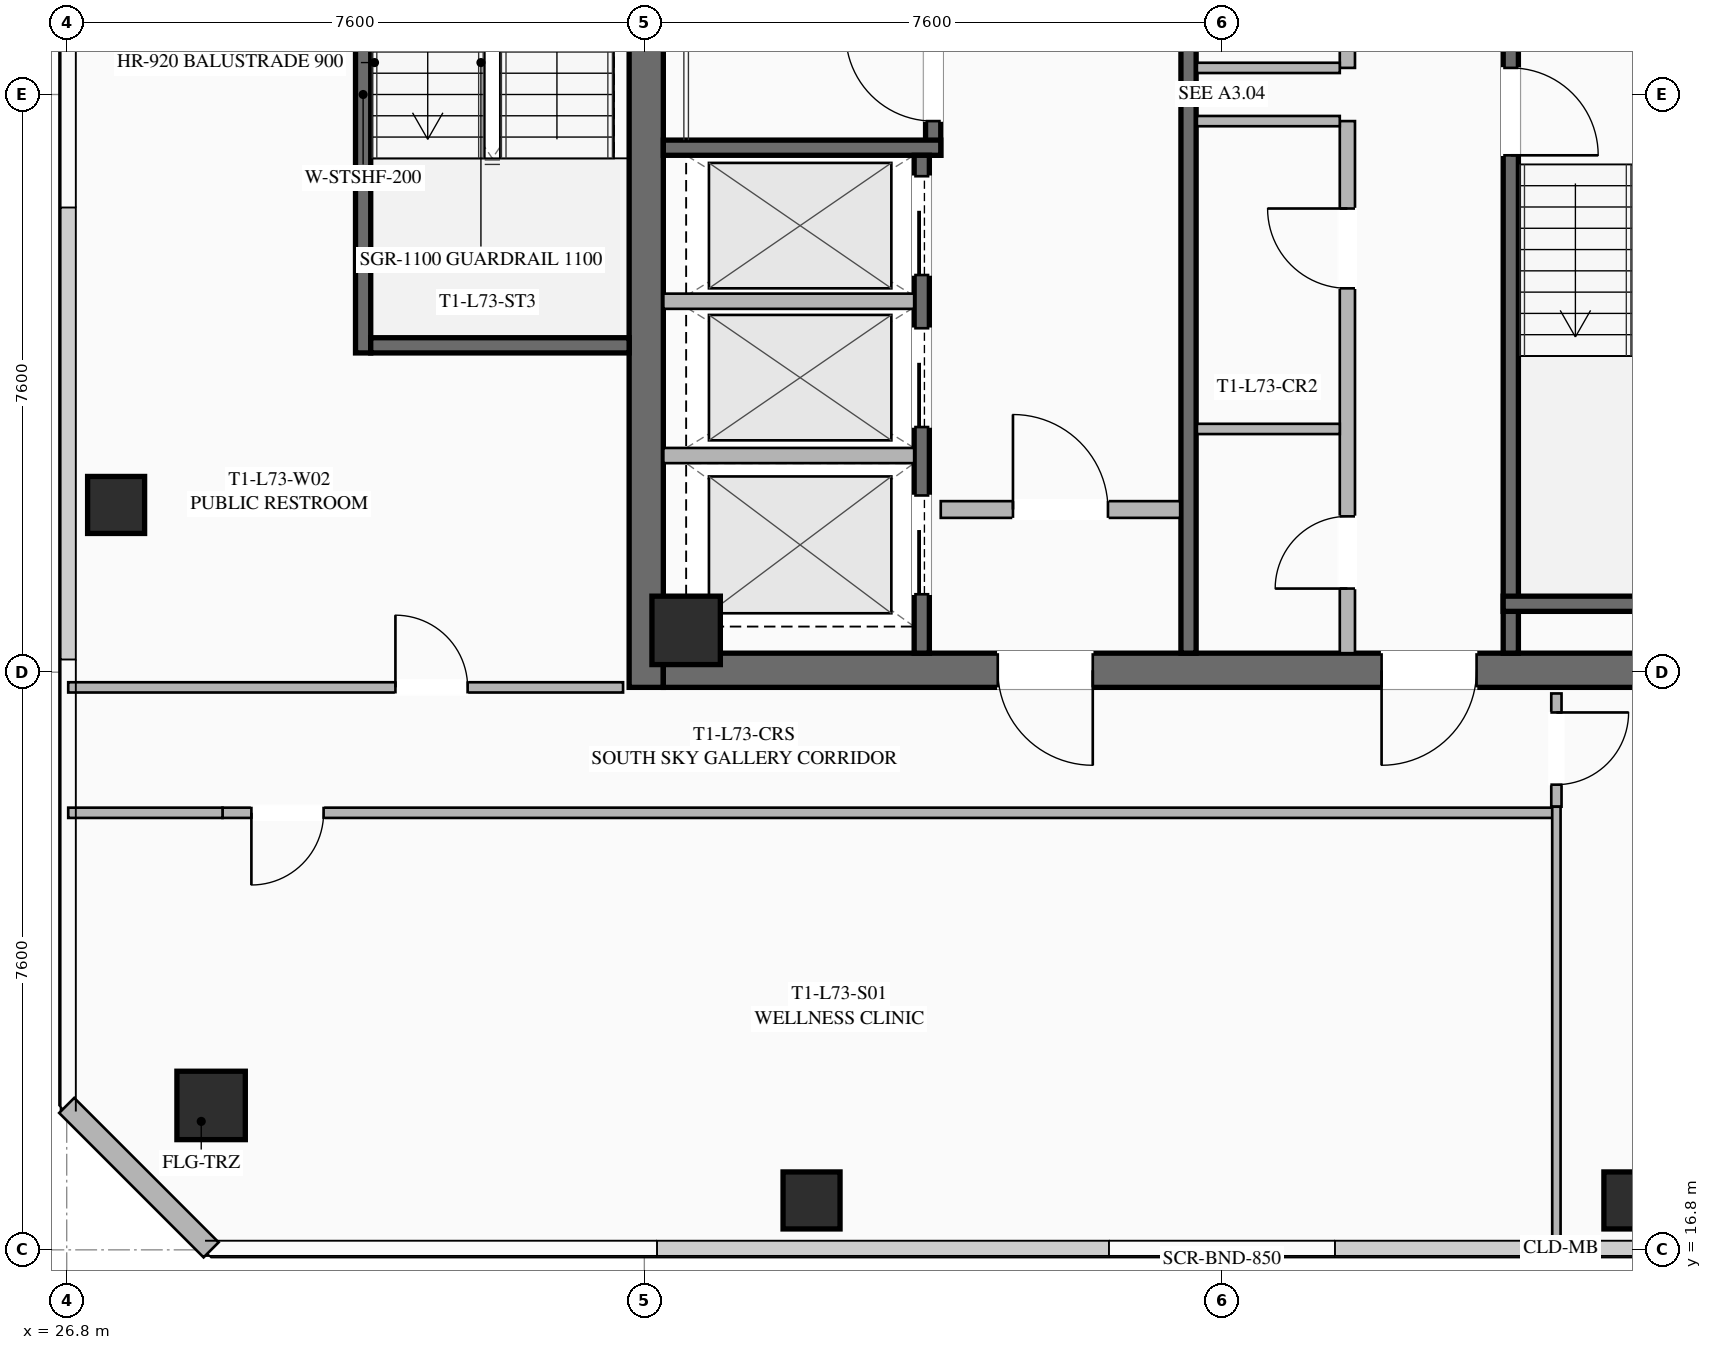
"""IFC4 building model, lengths in metres.
Left out: names, types, materials, properties, quantities, classifications, styles, units other than length and angle.
Written with IfcOpenShell. Run it as: python <this file> out.ifc"""

import sys

from ifc_helpers import new_model, si_unit, direction, frame, frame_2d, origin, origin_2d, place, context, subcontext, project, spatial, rectangle, hollow_rectangle, extrude, element, fill, save


model = new_model("IFC4")
c1 = context("Model", 3, precision=1e-05, world=origin(), true_north=direction((0.0, 1.0)))
c2 = subcontext(c1, "Body", "Model", "MODEL_VIEW")
j1 = project(units=[si_unit("LENGTHUNIT", "METRE"), si_unit("PLANEANGLEUNIT", "RADIAN")], contexts=[c1])
p1 = place(None, origin())
s1 = spatial("IfcSite", under=j1, at=p1, CompositionType="ELEMENT")
p2 = place(p1, origin())
s2 = spatial("IfcBuilding", under=s1, at=p2, CompositionType="ELEMENT")
p3 = place(p2, frame((0.0, 0.0, 270.5)))
s3 = spatial("IfcBuildingStorey", under=s2, at=p3, CompositionType="ELEMENT", Elevation=270.5)
p4 = place(p3, frame((34.425, 24.2, 0.0), z_axis=(0.0, 0.0, 1.0), x_axis=(0.0, 1.0, 0.0)))
e1 = element("IfcWall", 1, at=p4, inside=s3, PredefinedType="SHEAR", context=c2, shape_type="SweptSolid", body=[
    extrude(rectangle(XDim=15.6, YDim=0.45, at=frame_2d((7.8, 0.0))), origin(), (0.0, 0.0, 1.0), 3.55),
])
p5 = place(p3, frame((49.35, 24.425, 0.0), z_axis=(0.0, 0.0, 1.0), x_axis=(-1.0, 0.0, 0.0)))
e2 = element("IfcWall", 2, at=p5, inside=s3, PredefinedType="SHEAR", context=c2, shape_type="SweptSolid", body=[
    extrude(rectangle(XDim=14.7, YDim=0.45, at=frame_2d((7.35, 0.0))), origin(), (0.0, 0.0, 1.0), 3.55),
])
p6 = place(p5, frame((9.05, 0.0, 0.0)))
e3 = element("IfcOpeningElement", 3, at=p6, cuts=e2, PredefinedType="OPENING", context=c2, shape_type="SweptSolid", body=[
    extrude(rectangle(XDim=1.25, YDim=2.25, at=frame_2d((0.625, 1.125))), frame((0.0, 0.235, 0.0), z_axis=(0.0, -1.0, 0.0), x_axis=(1.0, 0.0, 0.0)), (0.0, 0.0, 1.0), 0.47),
])
p7 = place(p5, frame((4.0, 0.0, 0.0)))
e4 = element("IfcOpeningElement", 4, at=p7, cuts=e2, PredefinedType="OPENING", context=c2, shape_type="SweptSolid", body=[
    extrude(rectangle(XDim=1.25, YDim=2.25, at=frame_2d((0.625, 1.125))), frame((0.0, 0.235, 0.0), z_axis=(0.0, -1.0, 0.0), x_axis=(1.0, 0.0, 0.0)), (0.0, 0.0, 1.0), 0.47),
])
for number, where, z_axis, x_axis in (
    (5, (34.95, 24.95, 0.0), (0.0, 0.0, 1.0), (1.0, 0.0, 0.0)),
    (6, (28.7, 18.7, 0.0), (0.0, 0.0, 1.0), (1.0, 0.0, 0.0)),
):
    element("IfcColumn", number, at=place(p3, frame(where, z_axis=z_axis, x_axis=x_axis)), inside=s3, PredefinedType="COLUMN", context=c2, shape_type="SweptSolid", body=[
        extrude(hollow_rectangle(XDim=0.9, YDim=0.9, WallThickness=0.04, at=origin_2d()), origin(), (0.0, 0.0, 1.0), 3.37),
    ])
for number, where, z_axis, x_axis in (
    (7, (36.6, 17.45, 0.0), (0.0, 0.0, 1.0), (1.0, 0.0, 0.0)),
    (8, (47.4, 17.45, 0.0), (0.0, 0.0, 1.0), (1.0, 0.0, 0.0)),
    (9, (27.45, 26.6, 0.0), (0.0, 0.0, 1.0), (1.0, 0.0, 0.0)),
):
    element("IfcColumn", number, at=place(p3, frame(where, z_axis=z_axis, x_axis=x_axis)), inside=s3, PredefinedType="COLUMN", context=c2, shape_type="SweptSolid", body=[
        extrude(hollow_rectangle(XDim=0.75, YDim=0.75, WallThickness=0.032, at=origin_2d()), origin(), (0.0, 0.0, 1.0), 3.37),
    ])
p8 = place(p3, frame((28.7, 16.8, 0.0), z_axis=(0.0, 0.0, 1.0), x_axis=(-0.707106781187, 0.707106781187, 0.0)))
e10 = element("IfcWall", 10, at=p8, inside=s3, PredefinedType="SOLIDWALL", context=c2, shape_type="SweptSolid", body=[
    extrude(rectangle(XDim=2.687, YDim=0.28, at=frame_2d((1.343, 0.0))), origin(), (0.0, 0.0, 1.0), 3.37),
])
p9 = place(p3, frame((38.2, 31.2, 0.0), z_axis=(0.0, 0.0, 1.0), x_axis=(0.0, 1.0, 0.0)))
e11 = element("IfcWall", 11, at=p9, inside=s3, PredefinedType="SHEAR", context=c2, shape_type="SweptSolid", body=[
    extrude(rectangle(XDim=8.15, YDim=0.2, at=frame_2d((4.075, 0.0))), origin(), (0.0, 0.0, 1.0), 3.37),
])
p10 = place(p9, frame((0.45, 0.0, 0.0)))
e12 = element("IfcOpeningElement", 12, at=p10, cuts=e11, PredefinedType="OPENING", context=c2, shape_type="SweptSolid", body=[
    extrude(rectangle(XDim=1.15, YDim=2.2, at=frame_2d((0.575, 1.1))), frame((0.0, 0.11, 0.0), z_axis=(0.0, -1.0, 0.0), x_axis=(1.0, 0.0, 0.0)), (0.0, 0.0, 1.0), 0.22),
])
p11 = place(p3, frame((34.65, 31.3, 0.0), z_axis=(0.0, 0.0, 1.0), x_axis=(1.0, 0.0, 0.0)))
e13 = element("IfcWall", 13, at=p11, inside=s3, PredefinedType="SHEAR", context=c2, shape_type="SweptSolid", body=[
    extrude(rectangle(XDim=3.65, YDim=0.2, at=frame_2d((1.825, 0.0))), origin(), (0.0, 0.0, 1.0), 3.37),
])
p12 = place(p3, frame((45.8, 32.8, 0.0), z_axis=(0.0, 0.0, 1.0), x_axis=(0.0, -1.0, 0.0)))
e14 = element("IfcWall", 14, at=p12, inside=s3, PredefinedType="SHEAR", context=c2, shape_type="SweptSolid", body=[
    extrude(rectangle(XDim=8.15, YDim=0.2, at=frame_2d((4.075, 0.0))), origin(), (0.0, 0.0, 1.0), 3.37),
])
p13 = place(p12, frame((0.45, 0.0, 0.0)))
e15 = element("IfcOpeningElement", 15, at=p13, cuts=e14, PredefinedType="OPENING", context=c2, shape_type="SweptSolid", body=[
    extrude(rectangle(XDim=1.15, YDim=2.2, at=frame_2d((0.575, 1.1))), frame((0.0, 0.11, 0.0), z_axis=(0.0, -1.0, 0.0), x_axis=(1.0, 0.0, 0.0)), (0.0, 0.0, 1.0), 0.22),
])
p14 = place(p3, frame((45.7, 25.3, 0.0), z_axis=(0.0, 0.0, 1.0), x_axis=(1.0, 0.0, 0.0)))
e16 = element("IfcWall", 16, at=p14, inside=s3, PredefinedType="SHEAR", context=c2, shape_type="SweptSolid", body=[
    extrude(rectangle(XDim=3.65, YDim=0.2, at=frame_2d((1.825, 0.0))), origin(), (0.0, 0.0, 1.0), 3.37),
])
p15 = place(p3, frame((41.56, 24.65, 0.0), z_axis=(0.0, 0.0, 1.0), x_axis=(0.0, 1.0, 0.0)))
e17 = element("IfcWall", 17, at=p15, inside=s3, PredefinedType="SHEAR", context=c2, shape_type="SweptSolid", body=[
    extrude(rectangle(XDim=14.7, YDim=0.2, at=frame_2d((7.35, 0.0))), origin(), (0.0, 0.0, 1.0), 3.37),
])
p16 = place(p3, frame((38.3, 26.54, 0.0), z_axis=(0.0, 0.0, 1.0), x_axis=(1.0, 0.0, 0.0)))
e18 = element("IfcWall", 18, at=p16, inside=s3, PredefinedType="SOLIDWALL", context=c2, shape_type="SweptSolid", body=[
    extrude(rectangle(XDim=3.15, YDim=0.22, at=frame_2d((1.575, 0.0))), origin(), (0.0, 0.0, 1.0), 2.723),
])
p17 = place(p16, frame((0.95, 0.0, 0.0)))
e19 = element("IfcOpeningElement", 19, at=p17, cuts=e18, PredefinedType="OPENING", context=c2, shape_type="SweptSolid", body=[
    extrude(rectangle(XDim=1.25, YDim=2.25, at=frame_2d((0.625, 1.125))), frame((0.0, 0.12, 0.0), z_axis=(0.0, -1.0, 0.0), x_axis=(1.0, 0.0, 0.0)), (0.0, 0.0, 1.0), 0.24),
])
p18 = place(p3, frame((38.05, 24.65, 0.0), z_axis=(0.0, 0.0, 1.0), x_axis=(0.0, 1.0, 0.0)))
e20 = element("IfcWall", 20, at=p18, inside=s3, PredefinedType="SHEAR", context=c2, shape_type="SweptSolid", body=[
    extrude(rectangle(XDim=6.55, YDim=0.2, at=frame_2d((3.275, 0.0))), origin(), (0.0, 0.0, 1.0), 3.37),
])
p19 = place(p18, frame((4.975, 0.0, 0.0)))
e21 = element("IfcOpeningElement", 21, at=p19, cuts=e20, PredefinedType="OPENING", context=c2, shape_type="SweptSolid", body=[
    extrude(rectangle(XDim=1.3, YDim=2.25, at=frame_2d((0.65, 1.125))), frame((0.0, 0.11, 0.0), z_axis=(0.0, -1.0, 0.0), x_axis=(1.0, 0.0, 0.0)), (0.0, 0.0, 1.0), 0.22),
])
p20 = place(p18, frame((2.975, 0.0, 0.0)))
e22 = element("IfcOpeningElement", 22, at=p20, cuts=e20, PredefinedType="OPENING", context=c2, shape_type="SweptSolid", body=[
    extrude(rectangle(XDim=1.3, YDim=2.25, at=frame_2d((0.65, 1.125))), frame((0.0, 0.11, 0.0), z_axis=(0.0, -1.0, 0.0), x_axis=(1.0, 0.0, 0.0)), (0.0, 0.0, 1.0), 0.22),
])
p21 = place(p18, frame((0.775, 0.0, 0.0)))
e23 = element("IfcOpeningElement", 23, at=p21, cuts=e20, PredefinedType="OPENING", context=c2, shape_type="SweptSolid", body=[
    extrude(rectangle(XDim=1.3, YDim=2.25, at=frame_2d((0.65, 1.125))), frame((0.0, 0.11, 0.0), z_axis=(0.0, -1.0, 0.0), x_axis=(1.0, 0.0, 0.0)), (0.0, 0.0, 1.0), 0.22),
])
for number, where, z_axis, x_axis in (
    (24, (34.65, 27.25, 0.0), (0.0, 0.0, 1.0), (1.0, 0.0, 0.0)),
    (25, (34.65, 29.28, 0.0), (0.0, 0.0, 1.0), (1.0, 0.0, 0.0)),
):
    element("IfcWall", number, at=place(p3, frame(where, z_axis=z_axis, x_axis=x_axis)), inside=s3, PredefinedType="SOLIDWALL", context=c2, shape_type="SweptSolid", body=[
        extrude(rectangle(XDim=3.3, YDim=0.2, at=frame_2d((1.65, 0.0))), origin(), (0.0, 0.0, 1.0), 3.37),
    ])
p22 = place(p3, frame((43.65, 24.65, 0.0), z_axis=(0.0, 0.0, 1.0), x_axis=(0.0, 1.0, 0.0)))
e26 = element("IfcWall", 26, at=p22, inside=s3, PredefinedType="SOLIDWALL", context=c2, shape_type="SweptSolid", body=[
    extrude(rectangle(XDim=7.0, YDim=0.2, at=frame_2d((3.5, 0.0))), origin(), (0.0, 0.0, 1.0), 2.723),
])
p23 = place(p22, frame((0.85, 0.0, 0.0)))
e27 = element("IfcOpeningElement", 27, at=p23, cuts=e26, PredefinedType="OPENING", context=c2, shape_type="SweptSolid", body=[
    extrude(rectangle(XDim=0.95, YDim=2.05, at=frame_2d((0.475, 1.025))), frame((0.0, 0.11, 0.0), z_axis=(0.0, -1.0, 0.0), x_axis=(1.0, 0.0, 0.0)), (0.0, 0.0, 1.0), 0.22),
])
p24 = place(p22, frame((4.8, 0.0, 0.0)))
e28 = element("IfcOpeningElement", 28, at=p24, cuts=e26, PredefinedType="OPENING", context=c2, shape_type="SweptSolid", body=[
    extrude(rectangle(XDim=1.05, YDim=2.2, at=frame_2d((0.525, 1.1))), frame((0.0, 0.11, 0.0), z_axis=(0.0, -1.0, 0.0), x_axis=(1.0, 0.0, 0.0)), (0.0, 0.0, 1.0), 0.22),
])
for number, where, z_axis, x_axis in (
    (29, (41.67, 31.65, 0.0), (0.0, 0.0, 1.0), (1.0, 0.0, 0.0)),
    (30, (41.67, 27.6, 0.0), (0.0, 0.0, 1.0), (1.0, 0.0, 0.0)),
):
    element("IfcWall", number, at=place(p3, frame(where, z_axis=z_axis, x_axis=x_axis)), inside=s3, PredefinedType="PARTITIONING", context=c2, shape_type="SweptSolid", body=[
        extrude(rectangle(XDim=1.88, YDim=0.135, at=frame_2d((0.94, 0.0))), origin(), (0.0, 0.0, 1.0), 2.723),
    ])
p25 = place(p3, frame((43.65, 32.35, 0.0), z_axis=(0.0, 0.0, 1.0), x_axis=(0.0, 1.0, 0.0)))
e31 = element("IfcWall", 31, at=p25, inside=s3, PredefinedType="SOLIDWALL", context=c2, shape_type="SweptSolid", body=[
    extrude(rectangle(XDim=7.0, YDim=0.2, at=frame_2d((3.5, 0.0))), origin(), (0.0, 0.0, 1.0), 2.723),
])
p26 = place(p25, frame((0.85, 0.0, 0.0)))
e32 = element("IfcOpeningElement", 32, at=p26, cuts=e31, PredefinedType="OPENING", context=c2, shape_type="SweptSolid", body=[
    extrude(rectangle(XDim=0.95, YDim=2.05, at=frame_2d((0.475, 1.025))), frame((0.0, 0.11, 0.0), z_axis=(0.0, -1.0, 0.0), x_axis=(1.0, 0.0, 0.0)), (0.0, 0.0, 1.0), 0.22),
])
p27 = place(p25, frame((4.85, 0.0, 0.0)))
e33 = element("IfcOpeningElement", 33, at=p27, cuts=e31, PredefinedType="OPENING", context=c2, shape_type="SweptSolid", body=[
    extrude(rectangle(XDim=0.95, YDim=2.05, at=frame_2d((0.475, 1.025))), frame((0.0, 0.11, 0.0), z_axis=(0.0, -1.0, 0.0), x_axis=(1.0, 0.0, 0.0)), (0.0, 0.0, 1.0), 0.22),
])
p28 = place(p3, frame((41.67, 32.35, 0.0), z_axis=(0.0, 0.0, 1.0), x_axis=(1.0, 0.0, 0.0)))
e34 = element("IfcWall", 34, at=p28, inside=s3, PredefinedType="PARTITIONING", context=c2, shape_type="SweptSolid", body=[
    extrude(rectangle(XDim=1.88, YDim=0.135, at=frame_2d((0.94, 0.0))), origin(), (0.0, 0.0, 1.0), 2.723),
])
p29 = place(p3, frame((30.7, 28.6, 0.0), z_axis=(0.0, 0.0, 1.0), x_axis=(0.0, 1.0, 0.0)))
e35 = element("IfcWall", 35, at=p29, inside=s3, PredefinedType="SHEAR", context=c2, shape_type="SweptSolid", body=[
    extrude(rectangle(XDim=6.8, YDim=0.2, at=frame_2d((3.4, 0.0))), origin(), (0.0, 0.0, 1.0), 3.37),
])
p30 = place(p3, frame((30.8, 28.7, 0.0), z_axis=(0.0, 0.0, 1.0), x_axis=(1.0, 0.0, 0.0)))
e36 = element("IfcWall", 36, at=p30, inside=s3, PredefinedType="SHEAR", context=c2, shape_type="SweptSolid", body=[
    extrude(rectangle(XDim=3.4, YDim=0.2, at=frame_2d((1.7, 0.0))), origin(), (0.0, 0.0, 1.0), 3.37),
])
p31 = place(p3, frame((46.4, 22.55, 0.0), z_axis=(0.0, 0.0, 1.0), x_axis=(-1.0, 0.0, 0.0)))
e37 = element("IfcWall", 37, at=p31, inside=s3, PredefinedType="PARTITIONING", context=c2, shape_type="SweptSolid", body=[
    extrude(rectangle(XDim=17.55, YDim=0.135, at=frame_2d((8.775, 0.0))), origin(), (0.0, 0.0, 1.0), 2.723),
])
p32 = place(p31, frame((16.22, 0.0, 0.0)))
e38 = element("IfcOpeningElement", 38, at=p32, cuts=e37, PredefinedType="OPENING", context=c2, shape_type="SweptSolid", body=[
    extrude(rectangle(XDim=0.95, YDim=2.05, at=frame_2d((0.475, 1.025))), frame((0.0, 0.077, 0.0), z_axis=(0.0, -1.0, 0.0), x_axis=(1.0, 0.0, 0.0)), (0.0, 0.0, 1.0), 0.155),
])
p33 = place(p3, frame((26.82, 22.55, 0.0), z_axis=(0.0, 0.0, 1.0), x_axis=(1.0, 0.0, 0.0)))
e39 = element("IfcWall", 39, at=p33, inside=s3, PredefinedType="PARTITIONING", context=c2, shape_type="SweptSolid", body=[
    extrude(rectangle(XDim=2.03, YDim=0.135, at=frame_2d((1.015, 0.0))), origin(), (0.0, 0.0, 1.0), 2.723),
])
p34 = place(p3, frame((46.4, 24.12, 0.0), z_axis=(0.0, 0.0, 1.0), x_axis=(0.0, -1.0, 0.0)))
e40 = element("IfcWall", 40, at=p34, inside=s3, PredefinedType="PARTITIONING", context=c2, shape_type="SweptSolid", body=[
    extrude(rectangle(XDim=1.49, YDim=0.135, at=frame_2d((0.745, 0.0))), origin(), (0.0, 0.0, 1.0), 2.723),
])
p35 = place(p34, frame((0.25, 0.0, 0.0)))
e41 = element("IfcOpeningElement", 41, at=p35, cuts=e40, PredefinedType="OPENING", context=c2, shape_type="SweptSolid", body=[
    extrude(rectangle(XDim=0.95, YDim=2.05, at=frame_2d((0.475, 1.025))), frame((0.0, 0.077, 0.0), z_axis=(0.0, -1.0, 0.0), x_axis=(1.0, 0.0, 0.0)), (0.0, 0.0, 1.0), 0.155),
])
p36 = place(p3, frame((46.4, 16.82, 0.0), z_axis=(0.0, 0.0, 1.0), x_axis=(0.0, 1.0, 0.0)))
e42 = element("IfcWall", 42, at=p36, inside=s3, PredefinedType="PARTITIONING", context=c2, shape_type="SweptSolid", body=[
    extrude(rectangle(XDim=5.81, YDim=0.11, at=frame_2d((2.905, 0.0))), origin(), (0.0, 0.0, 1.0), 2.723),
])
p37 = place(p3, frame((26.82, 24.2, 0.0), z_axis=(0.0, 0.0, 1.0), x_axis=(1.0, 0.0, 0.0)))
e43 = element("IfcWall", 43, at=p37, inside=s3, PredefinedType="PARTITIONING", context=c2, shape_type="SweptSolid", body=[
    extrude(rectangle(XDim=7.3, YDim=0.135, at=frame_2d((3.65, 0.0))), origin(), (0.0, 0.0, 1.0), 2.723),
])
p38 = place(p37, frame((4.305, 0.0, 0.0)))
e44 = element("IfcOpeningElement", 44, at=p38, cuts=e43, PredefinedType="OPENING", context=c2, shape_type="SweptSolid", body=[
    extrude(rectangle(XDim=0.95, YDim=2.05, at=frame_2d((0.475, 1.025))), frame((0.0, 0.077, 0.0), z_axis=(0.0, -1.0, 0.0), x_axis=(1.0, 0.0, 0.0)), (0.0, 0.0, 1.0), 0.155),
])
p39 = place(p6, origin())
e45 = element("IfcDoor", 45, at=p39, inside=s3, OperationType="SINGLE_SWING_LEFT", PredefinedType="DOOR", context=c2, shape_type="SweptSolid", body=[
    extrude(rectangle(XDim=1.25, YDim=2.25, at=frame_2d((0.625, 1.125))), frame((0.0, 0.025, 0.0), z_axis=(0.0, -1.0, 0.0), x_axis=(1.0, 0.0, 0.0)), (0.0, 0.0, 1.0), 0.05),
])
fill(e3, e45)
p40 = place(p7, origin())
e46 = element("IfcDoor", 46, at=p40, inside=s3, OperationType="SINGLE_SWING_RIGHT", PredefinedType="DOOR", context=c2, shape_type="SweptSolid", body=[
    extrude(rectangle(XDim=1.25, YDim=2.25, at=frame_2d((0.625, 1.125))), frame((0.0, 0.025, 0.0), z_axis=(0.0, -1.0, 0.0), x_axis=(1.0, 0.0, 0.0)), (0.0, 0.0, 1.0), 0.05),
])
fill(e4, e46)
p41 = place(p10, origin())
e47 = element("IfcDoor", 47, at=p41, inside=s3, OperationType="SINGLE_SWING_RIGHT", PredefinedType="DOOR", context=c2, shape_type="SweptSolid", body=[
    extrude(rectangle(XDim=1.15, YDim=2.2, at=frame_2d((0.575, 1.1))), frame((0.0, 0.025, 0.0), z_axis=(0.0, -1.0, 0.0), x_axis=(1.0, 0.0, 0.0)), (0.0, 0.0, 1.0), 0.05),
])
fill(e12, e47)
p42 = place(p13, origin())
e48 = element("IfcDoor", 48, at=p42, inside=s3, OperationType="SINGLE_SWING_RIGHT", PredefinedType="DOOR", context=c2, shape_type="SweptSolid", body=[
    extrude(rectangle(XDim=1.15, YDim=2.2, at=frame_2d((0.575, 1.1))), frame((0.0, 0.025, 0.0), z_axis=(0.0, -1.0, 0.0), x_axis=(1.0, 0.0, 0.0)), (0.0, 0.0, 1.0), 0.05),
])
fill(e15, e48)
p43 = place(p17, origin())
e49 = element("IfcDoor", 49, at=p43, inside=s3, OperationType="SINGLE_SWING_LEFT", PredefinedType="DOOR", context=c2, shape_type="SweptSolid", body=[
    extrude(rectangle(XDim=1.25, YDim=2.25, at=frame_2d((0.625, 1.125))), frame((0.0, 0.025, 0.0), z_axis=(0.0, -1.0, 0.0), x_axis=(1.0, 0.0, 0.0)), (0.0, 0.0, 1.0), 0.05),
])
fill(e19, e49)
p44 = place(p23, origin())
e50 = element("IfcDoor", 50, at=p44, inside=s3, OperationType="SINGLE_SWING_LEFT", PredefinedType="DOOR", context=c2, shape_type="SweptSolid", body=[
    extrude(rectangle(XDim=0.95, YDim=2.05, at=frame_2d((0.475, 1.025))), frame((0.0, 0.025, 0.0), z_axis=(0.0, -1.0, 0.0), x_axis=(1.0, 0.0, 0.0)), (0.0, 0.0, 1.0), 0.05),
])
fill(e27, e50)
p45 = place(p24, origin())
e51 = element("IfcDoor", 51, at=p45, inside=s3, OperationType="SINGLE_SWING_RIGHT", PredefinedType="DOOR", context=c2, shape_type="SweptSolid", body=[
    extrude(rectangle(XDim=1.05, YDim=2.2, at=frame_2d((0.525, 1.1))), frame((0.0, 0.025, 0.0), z_axis=(0.0, -1.0, 0.0), x_axis=(1.0, 0.0, 0.0)), (0.0, 0.0, 1.0), 0.05),
])
fill(e28, e51)
p46 = place(p32, origin())
e52 = element("IfcDoor", 52, at=p46, inside=s3, OperationType="SINGLE_SWING_RIGHT", PredefinedType="DOOR", context=c2, shape_type="SweptSolid", body=[
    extrude(rectangle(XDim=0.95, YDim=2.05, at=frame_2d((0.475, 1.025))), frame((0.0, 0.025, 0.0), z_axis=(0.0, -1.0, 0.0), x_axis=(1.0, 0.0, 0.0)), (0.0, 0.0, 1.0), 0.05),
])
fill(e38, e52)
p47 = place(p35, origin())
e53 = element("IfcDoor", 53, at=p47, inside=s3, OperationType="SINGLE_SWING_LEFT", PredefinedType="DOOR", context=c2, shape_type="SweptSolid", body=[
    extrude(rectangle(XDim=0.95, YDim=2.05, at=frame_2d((0.475, 1.025))), frame((0.0, 0.025, 0.0), z_axis=(0.0, -1.0, 0.0), x_axis=(1.0, 0.0, 0.0)), (0.0, 0.0, 1.0), 0.05),
])
fill(e41, e53)
p48 = place(p38, origin())
e54 = element("IfcDoor", 54, at=p48, inside=s3, OperationType="SINGLE_SWING_LEFT", PredefinedType="DOOR", context=c2, shape_type="SweptSolid", body=[
    extrude(rectangle(XDim=0.95, YDim=2.05, at=frame_2d((0.475, 1.025))), frame((0.0, 0.025, 0.0), z_axis=(0.0, -1.0, 0.0), x_axis=(1.0, 0.0, 0.0)), (0.0, 0.0, 1.0), 0.05),
])
fill(e44, e54)
p49 = place(p19, origin())
e55 = element("IfcDoor", 55, at=p49, inside=s3, OperationType="SLIDING_TO_LEFT", PredefinedType="DOOR", context=c2, shape_type="SweptSolid", body=[
    extrude(rectangle(XDim=1.3, YDim=2.25, at=frame_2d((0.65, 1.125))), frame((0.0, 0.025, 0.0), z_axis=(0.0, -1.0, 0.0), x_axis=(1.0, 0.0, 0.0)), (0.0, 0.0, 1.0), 0.05),
])
fill(e21, e55)
p50 = place(p20, origin())
e56 = element("IfcDoor", 56, at=p50, inside=s3, OperationType="SLIDING_TO_LEFT", PredefinedType="DOOR", context=c2, shape_type="SweptSolid", body=[
    extrude(rectangle(XDim=1.3, YDim=2.25, at=frame_2d((0.65, 1.125))), frame((0.0, 0.025, 0.0), z_axis=(0.0, -1.0, 0.0), x_axis=(1.0, 0.0, 0.0)), (0.0, 0.0, 1.0), 0.05),
])
fill(e22, e56)
p51 = place(p21, origin())
e57 = element("IfcDoor", 57, at=p51, inside=s3, OperationType="SLIDING_TO_LEFT", PredefinedType="DOOR", context=c2, shape_type="SweptSolid", body=[
    extrude(rectangle(XDim=1.3, YDim=2.25, at=frame_2d((0.65, 1.125))), frame((0.0, 0.025, 0.0), z_axis=(0.0, -1.0, 0.0), x_axis=(1.0, 0.0, 0.0)), (0.0, 0.0, 1.0), 0.05),
])
fill(e23, e57)
save(model, sys.argv[1])
